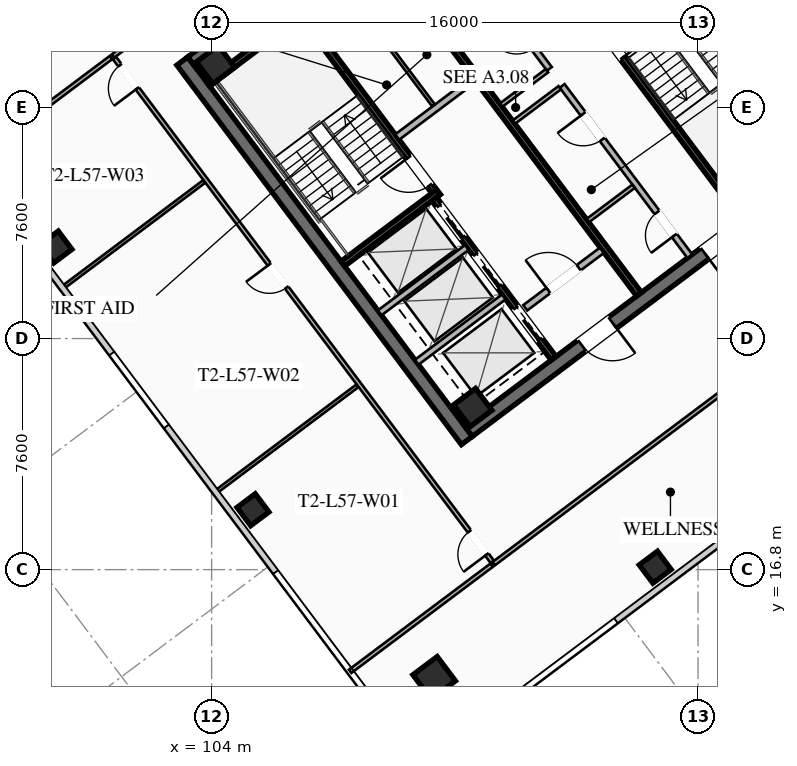
"""IFC4 building model, lengths in metres.
Left out: names, types, materials, properties, quantities, classifications, styles, units other than length and angle.
Written with IfcOpenShell. Run it as: python <this file> out.ifc"""

import sys

from ifc_helpers import new_model, si_unit, direction, frame, frame_2d, origin, origin_2d, place, context, subcontext, project, spatial, rectangle, hollow_rectangle, extrude, element, fill, save


model = new_model("IFC4")
c1 = context("Model", 3, precision=1e-05, world=origin(), true_north=direction((0.0, 1.0)))
c2 = subcontext(c1, "Body", "Model", "MODEL_VIEW")
j1 = project(units=[si_unit("LENGTHUNIT", "METRE"), si_unit("PLANEANGLEUNIT", "RADIAN")], contexts=[c1])
p1 = place(None, origin())
s1 = spatial("IfcSite", under=j1, at=p1, CompositionType="ELEMENT")
p2 = place(p1, origin())
s2 = spatial("IfcBuilding", under=s1, at=p2, CompositionType="ELEMENT")
p3 = place(p2, frame((0.0, 0.0, 211.3)))
s3 = spatial("IfcBuildingStorey", under=s2, at=p3, CompositionType="ELEMENT", Elevation=211.3)
for number, where, z_axis, x_axis in (
    (1, (112.396, 21.047, 0.0), (0.0, 0.0, 1.0), (-0.6, 0.8, 0.0)),
    (2, (115.604, 42.953, 0.0), (0.0, 0.0, 1.0), (0.6, -0.8, 0.0)),
):
    element("IfcWall", number, at=place(p3, frame(where, z_axis=z_axis, x_axis=x_axis)), inside=s3, PredefinedType="SHEAR", context=c2, shape_type="SweptSolid", body=[
        extrude(rectangle(XDim=15.6, YDim=0.45, at=frame_2d((7.8, 0.0))), origin(), (0.0, 0.0, 1.0), 3.55),
    ])
p4 = place(p3, frame((124.649, 30.518, 0.0), z_axis=(0.0, 0.0, 1.0), x_axis=(-0.8, -0.6, 0.0)))
e3 = element("IfcWall", 3, at=p4, inside=s3, PredefinedType="SHEAR", context=c2, shape_type="SweptSolid", body=[
    extrude(rectangle(XDim=15.26, YDim=0.45, at=frame_2d((7.63, 0.0))), origin(), (0.0, 0.0, 1.0), 3.55),
])
p5 = place(p4, frame((9.33, 0.0, 0.0)))
e4 = element("IfcOpeningElement", 4, at=p5, cuts=e3, PredefinedType="OPENING", context=c2, shape_type="SweptSolid", body=[
    extrude(rectangle(XDim=1.25, YDim=2.25, at=frame_2d((0.625, 1.125))), frame((0.0, 0.235, 0.0), z_axis=(0.0, -1.0, 0.0), x_axis=(1.0, 0.0, 0.0)), (0.0, 0.0, 1.0), 0.47),
])
p6 = place(p4, frame((4.28, 0.0, 0.0)))
e5 = element("IfcOpeningElement", 5, at=p6, cuts=e3, PredefinedType="OPENING", context=c2, shape_type="SweptSolid", body=[
    extrude(rectangle(XDim=1.25, YDim=2.25, at=frame_2d((0.625, 1.125))), frame((0.0, 0.235, 0.0), z_axis=(0.0, -1.0, 0.0), x_axis=(1.0, 0.0, 0.0)), (0.0, 0.0, 1.0), 0.47),
])
p7 = place(p3, frame((103.351, 33.482, 0.0), z_axis=(0.0, 0.0, 1.0), x_axis=(0.8, 0.6, 0.0)))
e6 = element("IfcWall", 6, at=p7, inside=s3, PredefinedType="SHEAR", context=c2, shape_type="SweptSolid", body=[
    extrude(rectangle(XDim=15.26, YDim=0.45, at=frame_2d((7.63, 0.0))), origin(), (0.0, 0.0, 1.0), 3.55),
])
p8 = place(p7, frame((4.68, 0.0, 0.0)))
e7 = element("IfcOpeningElement", 7, at=p8, cuts=e6, PredefinedType="OPENING", context=c2, shape_type="SweptSolid", body=[
    extrude(rectangle(XDim=1.25, YDim=2.25, at=frame_2d((0.625, 1.125))), frame((0.0, 0.235, 0.0), z_axis=(0.0, -1.0, 0.0), x_axis=(1.0, 0.0, 0.0)), (0.0, 0.0, 1.0), 0.47),
])
p9 = place(p7, frame((9.73, 0.0, 0.0)))
e8 = element("IfcOpeningElement", 8, at=p9, cuts=e6, PredefinedType="OPENING", context=c2, shape_type="SweptSolid", body=[
    extrude(rectangle(XDim=1.25, YDim=2.25, at=frame_2d((0.625, 1.125))), frame((0.0, 0.235, 0.0), z_axis=(0.0, -1.0, 0.0), x_axis=(1.0, 0.0, 0.0)), (0.0, 0.0, 1.0), 0.47),
])
for number, where, z_axis, x_axis in (
    (9, (112.59, 22.13, 0.0), (0.0, 0.0, 1.0), (0.8, 0.6, 0.0)),
    (10, (104.13, 33.41, 0.0), (0.0, 0.0, 1.0), (0.8, 0.6, 0.0)),
):
    element("IfcColumn", number, at=place(p3, frame(where, z_axis=z_axis, x_axis=x_axis)), inside=s3, PredefinedType="COLUMN", context=c2, shape_type="SweptSolid", body=[
        extrude(hollow_rectangle(XDim=0.9, YDim=0.9, WallThickness=0.04, at=origin_2d()), origin(), (0.0, 0.0, 1.0), 3.37),
    ])
p10 = place(p3, frame((111.32, 13.24, 0.0), z_axis=(0.0, 0.0, 1.0), x_axis=(0.799999996291, 0.600000004945, 0.0)))
e11 = element("IfcColumn", 11, at=p10, inside=s3, PredefinedType="COLUMN", context=c2, shape_type="SweptSolid", body=[
    extrude(hollow_rectangle(XDim=1.0, YDim=1.0, WallThickness=0.04, at=origin_2d()), origin(), (0.0, 0.0, 1.0), 3.37),
])
for number, where, z_axis, x_axis in (
    (12, (118.59, 16.88, 0.0), (0.0, 0.0, 1.0), (0.8, 0.6, 0.0)),
    (13, (98.88, 27.41, 0.0), (0.0, 0.0, 1.0), (0.8, 0.6, 0.0)),
    (14, (105.36, 18.77, 0.0), (0.0, 0.0, 1.0), (0.8, 0.6, 0.0)),
):
    element("IfcColumn", number, at=place(p3, frame(where, z_axis=z_axis, x_axis=x_axis)), inside=s3, PredefinedType="COLUMN", context=c2, shape_type="SweptSolid", body=[
        extrude(hollow_rectangle(XDim=0.75, YDim=0.75, WallThickness=0.032, at=origin_2d()), origin(), (0.0, 0.0, 1.0), 3.37),
    ])
p11 = place(p3, frame((111.44, 29.08, 0.0), z_axis=(0.0, 0.0, 1.0), x_axis=(-0.59999041401, 0.800007189403, 0.0)))
e15 = element("IfcWall", 15, at=p11, inside=s3, PredefinedType="SHEAR", context=c2, shape_type="SweptSolid", body=[
    extrude(rectangle(XDim=8.15, YDim=0.2, at=frame_2d((4.075, 0.0))), origin(), (0.0, 0.0, 1.0), 3.37),
])
p12 = place(p11, frame((0.45, 0.0, 0.0)))
e16 = element("IfcOpeningElement", 16, at=p12, cuts=e15, PredefinedType="OPENING", context=c2, shape_type="SweptSolid", body=[
    extrude(rectangle(XDim=1.15, YDim=2.2, at=frame_2d((0.575, 1.1))), frame((0.0, 0.11, 0.0), z_axis=(0.0, -1.0, 0.0), x_axis=(1.0, 0.0, 0.0)), (0.0, 0.0, 1.0), 0.22),
])
for number, where, z_axis, x_axis in (
    (17, (108.316, 26.862, 0.0), (0.0, 0.0, 1.0), (0.8, 0.6, 0.0)),
    (18, (103.876, 32.782, 0.0), (0.0, 0.0, 1.0), (0.8, 0.6, 0.0)),
):
    element("IfcWall", number, at=place(p3, frame(where, z_axis=z_axis, x_axis=x_axis)), inside=s3, PredefinedType="SHEAR", context=c2, shape_type="SweptSolid", body=[
        extrude(rectangle(XDim=3.93, YDim=0.2, at=frame_2d((1.965, 0.0))), origin(), (0.0, 0.0, 1.0), 3.37),
    ])
p13 = place(p3, frame((116.56, 34.92, 0.0), z_axis=(0.0, 0.0, 1.0), x_axis=(0.59999041401, -0.800007189403, 0.0)))
e19 = element("IfcWall", 19, at=p13, inside=s3, PredefinedType="SHEAR", context=c2, shape_type="SweptSolid", body=[
    extrude(rectangle(XDim=8.15, YDim=0.2, at=frame_2d((4.075, 0.0))), origin(), (0.0, 0.0, 1.0), 3.37),
])
p14 = place(p13, frame((0.45, 0.0, 0.0)))
e20 = element("IfcOpeningElement", 20, at=p14, cuts=e19, PredefinedType="OPENING", context=c2, shape_type="SweptSolid", body=[
    extrude(rectangle(XDim=1.15, YDim=2.2, at=frame_2d((0.575, 1.1))), frame((0.0, 0.11, 0.0), z_axis=(0.0, -1.0, 0.0), x_axis=(1.0, 0.0, 0.0)), (0.0, 0.0, 1.0), 0.22),
])
p15 = place(p3, frame((118.058, 25.856, 0.0), z_axis=(0.0, 0.0, 1.0), x_axis=(-0.600002657301, 0.799998007018, 0.0)))
e21 = element("IfcWall", 21, at=p15, inside=s3, PredefinedType="SHEAR", context=c2, shape_type="SweptSolid", body=[
    extrude(rectangle(XDim=14.7, YDim=0.2, at=frame_2d((7.35, 0.0))), origin(), (0.0, 0.0, 1.0), 3.37),
])
p16 = place(p3, frame((110.104, 31.028, 0.0), z_axis=(0.0, 0.0, 1.0), x_axis=(0.800018601094, 0.59997519774, 0.0)))
e22 = element("IfcWall", 22, at=p16, inside=s3, PredefinedType="SOLIDWALL", context=c2, shape_type="SweptSolid", body=[
    extrude(rectangle(XDim=3.15, YDim=0.22, at=frame_2d((1.575, 0.0))), origin(), (0.0, 0.0, 1.0), 2.723),
])
p17 = place(p3, frame((114.316, 25.412, 0.0), z_axis=(0.0, 0.0, 1.0), x_axis=(0.800018601094, 0.59997519774, 0.0)))
e23 = element("IfcWall", 23, at=p17, inside=s3, PredefinedType="SOLIDWALL", context=c2, shape_type="SweptSolid", body=[
    extrude(rectangle(XDim=3.15, YDim=0.22, at=frame_2d((1.575, 0.0))), origin(), (0.0, 0.0, 1.0), 2.723),
])
p18 = place(p17, frame((0.95, 0.0, 0.0)))
e24 = element("IfcOpeningElement", 24, at=p18, cuts=e23, PredefinedType="OPENING", context=c2, shape_type="SweptSolid", body=[
    extrude(rectangle(XDim=1.25, YDim=2.25, at=frame_2d((0.625, 1.125))), frame((0.0, 0.12, 0.0), z_axis=(0.0, -1.0, 0.0), x_axis=(1.0, 0.0, 0.0)), (0.0, 0.0, 1.0), 0.24),
])
p19 = place(p3, frame((115.25, 23.75, 0.0), z_axis=(0.0, 0.0, 1.0), x_axis=(-0.599994036198, 0.800004472816, 0.0)))
e25 = element("IfcWall", 25, at=p19, inside=s3, PredefinedType="SHEAR", context=c2, shape_type="SweptSolid", body=[
    extrude(rectangle(XDim=6.55, YDim=0.2, at=frame_2d((3.275, 0.0))), origin(), (0.0, 0.0, 1.0), 3.37),
])
p20 = place(p19, frame((4.975, 0.0, 0.0)))
e26 = element("IfcOpeningElement", 26, at=p20, cuts=e25, PredefinedType="OPENING", context=c2, shape_type="SweptSolid", body=[
    extrude(rectangle(XDim=1.3, YDim=2.25, at=frame_2d((0.65, 1.125))), frame((0.0, 0.11, 0.0), z_axis=(0.0, -1.0, 0.0), x_axis=(1.0, 0.0, 0.0)), (0.0, 0.0, 1.0), 0.22),
])
p21 = place(p19, frame((2.975, 0.0, 0.0)))
e27 = element("IfcOpeningElement", 27, at=p21, cuts=e25, PredefinedType="OPENING", context=c2, shape_type="SweptSolid", body=[
    extrude(rectangle(XDim=1.3, YDim=2.25, at=frame_2d((0.65, 1.125))), frame((0.0, 0.11, 0.0), z_axis=(0.0, -1.0, 0.0), x_axis=(1.0, 0.0, 0.0)), (0.0, 0.0, 1.0), 0.22),
])
p22 = place(p19, frame((0.775, 0.0, 0.0)))
e28 = element("IfcOpeningElement", 28, at=p22, cuts=e25, PredefinedType="OPENING", context=c2, shape_type="SweptSolid", body=[
    extrude(rectangle(XDim=1.3, YDim=2.25, at=frame_2d((0.65, 1.125))), frame((0.0, 0.11, 0.0), z_axis=(0.0, -1.0, 0.0), x_axis=(1.0, 0.0, 0.0)), (0.0, 0.0, 1.0), 0.22),
])
for number, where, z_axis, x_axis in (
    (29, (110.746, 23.622, 0.0), (0.0, 0.0, 1.0), (0.8, 0.6, 0.0)),
    (30, (109.528, 25.246, 0.0), (0.0, 0.0, 1.0), (0.8, 0.6, 0.0)),
):
    element("IfcWall", number, at=place(p3, frame(where, z_axis=z_axis, x_axis=x_axis)), inside=s3, PredefinedType="SOLIDWALL", context=c2, shape_type="SweptSolid", body=[
        extrude(rectangle(XDim=3.58, YDim=0.2, at=frame_2d((1.79, 0.0))), origin(), (0.0, 0.0, 1.0), 3.37),
    ])
p23 = place(p3, frame((111.296, 32.072, 0.0), z_axis=(0.0, 0.0, 1.0), x_axis=(-0.59995887973, 0.800030838552, 0.0)))
e31 = element("IfcWall", 31, at=p23, inside=s3, PredefinedType="PARTITIONING", context=c2, shape_type="SweptSolid", body=[
    extrude(rectangle(XDim=3.8, YDim=0.11, at=frame_2d((1.9, 0.0))), origin(), (0.0, 0.0, 1.0), 2.723),
])
p24 = place(p3, frame((119.73, 27.11, 0.0), z_axis=(0.0, 0.0, 1.0), x_axis=(-0.600005580459, 0.799995814625, 0.0)))
e32 = element("IfcWall", 32, at=p24, inside=s3, PredefinedType="SOLIDWALL", context=c2, shape_type="SweptSolid", body=[
    extrude(rectangle(XDim=7.0, YDim=0.2, at=frame_2d((3.5, 0.0))), origin(), (0.0, 0.0, 1.0), 2.723),
])
p25 = place(p24, frame((0.85, 0.0, 0.0)))
e33 = element("IfcOpeningElement", 33, at=p25, cuts=e32, PredefinedType="OPENING", context=c2, shape_type="SweptSolid", body=[
    extrude(rectangle(XDim=0.95, YDim=2.05, at=frame_2d((0.475, 1.025))), frame((0.0, 0.11, 0.0), z_axis=(0.0, -1.0, 0.0), x_axis=(1.0, 0.0, 0.0)), (0.0, 0.0, 1.0), 0.22),
])
p26 = place(p24, frame((4.8, 0.0, 0.0)))
e34 = element("IfcOpeningElement", 34, at=p26, cuts=e32, PredefinedType="OPENING", context=c2, shape_type="SweptSolid", body=[
    extrude(rectangle(XDim=1.05, YDim=2.2, at=frame_2d((0.525, 1.1))), frame((0.0, 0.11, 0.0), z_axis=(0.0, -1.0, 0.0), x_axis=(1.0, 0.0, 0.0)), (0.0, 0.0, 1.0), 0.22),
])
for number, where, z_axis, x_axis in (
    (35, (113.946, 31.522, 0.0), (0.0, 0.0, 1.0), (0.8, 0.6, 0.0)),
    (36, (116.376, 28.282, 0.0), (0.0, 0.0, 1.0), (0.8, 0.6, 0.0)),
):
    element("IfcWall", number, at=place(p3, frame(where, z_axis=z_axis, x_axis=x_axis)), inside=s3, PredefinedType="PARTITIONING", context=c2, shape_type="SweptSolid", body=[
        extrude(rectangle(XDim=1.88, YDim=0.135, at=frame_2d((0.94, 0.0))), origin(), (0.0, 0.0, 1.0), 2.723),
    ])
p27 = place(p3, frame((115.11, 33.27, 0.0), z_axis=(0.0, 0.0, 1.0), x_axis=(-0.600011160345, 0.79999162962, 0.0)))
e37 = element("IfcWall", 37, at=p27, inside=s3, PredefinedType="SOLIDWALL", context=c2, shape_type="SweptSolid", body=[
    extrude(rectangle(XDim=7.0, YDim=0.2, at=frame_2d((3.5, 0.0))), origin(), (0.0, 0.0, 1.0), 2.723),
])
p28 = place(p27, frame((0.85, 0.0, 0.0)))
e38 = element("IfcOpeningElement", 38, at=p28, cuts=e37, PredefinedType="OPENING", context=c2, shape_type="SweptSolid", body=[
    extrude(rectangle(XDim=0.95, YDim=2.05, at=frame_2d((0.475, 1.025))), frame((0.0, 0.11, 0.0), z_axis=(0.0, -1.0, 0.0), x_axis=(1.0, 0.0, 0.0)), (0.0, 0.0, 1.0), 0.22),
])
p29 = place(p27, frame((4.85, 0.0, 0.0)))
e39 = element("IfcOpeningElement", 39, at=p29, cuts=e37, PredefinedType="OPENING", context=c2, shape_type="SweptSolid", body=[
    extrude(rectangle(XDim=0.95, YDim=2.05, at=frame_2d((0.475, 1.025))), frame((0.0, 0.11, 0.0), z_axis=(0.0, -1.0, 0.0), x_axis=(1.0, 0.0, 0.0)), (0.0, 0.0, 1.0), 0.22),
])
p30 = place(p3, frame((113.526, 32.082, 0.0), z_axis=(0.0, 0.0, 1.0), x_axis=(0.800046745961, 0.599937666993, 0.0)))
e40 = element("IfcWall", 40, at=p30, inside=s3, PredefinedType="PARTITIONING", context=c2, shape_type="SweptSolid", body=[
    extrude(rectangle(XDim=1.88, YDim=0.135, at=frame_2d((0.94, 0.0))), origin(), (0.0, 0.0, 1.0), 2.723),
])
p31 = place(p3, frame((100.756, 33.692, 0.0), z_axis=(0.0, 0.0, 1.0), x_axis=(0.799998716732, 0.60000171102, 0.0)))
e41 = element("IfcWall", 41, at=p31, inside=s3, PredefinedType="PARTITIONING", context=c2, shape_type="SweptSolid", body=[
    extrude(rectangle(XDim=22.83, YDim=0.135, at=frame_2d((11.415, 0.0))), origin(), (0.0, 0.0, 1.0), 2.723),
])
p32 = place(p31, frame((9.38, 0.0, 0.0)))
e42 = element("IfcOpeningElement", 42, at=p32, cuts=e41, PredefinedType="OPENING", context=c2, shape_type="SweptSolid", body=[
    extrude(rectangle(XDim=0.95, YDim=2.05, at=frame_2d((0.475, 1.025))), frame((0.0, 0.077, 0.0), z_axis=(0.0, -1.0, 0.0), x_axis=(1.0, 0.0, 0.0)), (0.0, 0.0, 1.0), 0.155),
])
p33 = place(p31, frame((21.58, 0.0, 0.0)))
e43 = element("IfcOpeningElement", 43, at=p33, cuts=e41, PredefinedType="OPENING", context=c2, shape_type="SweptSolid", body=[
    extrude(rectangle(XDim=0.95, YDim=2.05, at=frame_2d((0.475, 1.025))), frame((0.0, 0.077, 0.0), z_axis=(0.0, -1.0, 0.0), x_axis=(1.0, 0.0, 0.0)), (0.0, 0.0, 1.0), 0.155),
])
p34 = place(p3, frame((124.462, 25.384, 0.0), z_axis=(0.0, 0.0, 1.0), x_axis=(-0.799997904343, -0.6000027942, 0.0)))
e44 = element("IfcWall", 44, at=p34, inside=s3, PredefinedType="PARTITIONING", context=c2, shape_type="SweptSolid", body=[
    extrude(rectangle(XDim=13.98, YDim=0.135, at=frame_2d((6.99, 0.0))), origin(), (0.0, 0.0, 1.0), 2.723),
])
p35 = place(p34, frame((3.635, 0.0, 0.0)))
e45 = element("IfcOpeningElement", 45, at=p35, cuts=e44, PredefinedType="OPENING", context=c2, shape_type="SweptSolid", body=[
    extrude(rectangle(XDim=0.95, YDim=2.05, at=frame_2d((0.475, 1.025))), frame((0.0, 0.077, 0.0), z_axis=(0.0, -1.0, 0.0), x_axis=(1.0, 0.0, 0.0)), (0.0, 0.0, 1.0), 0.155),
])
p36 = place(p3, frame((113.23, 17.06, 0.0), z_axis=(0.0, 0.0, 1.0), x_axis=(-0.600003772342, 0.79999717073, 0.0)))
e46 = element("IfcWall", 46, at=p36, inside=s3, PredefinedType="PARTITIONING", context=c2, shape_type="SweptSolid", body=[
    extrude(rectangle(XDim=20.71, YDim=0.135, at=frame_2d((10.355, 0.0))), origin(), (0.0, 0.0, 1.0), 2.723),
])
p37 = place(p36, frame((0.3, 0.0, 0.0)))
e47 = element("IfcOpeningElement", 47, at=p37, cuts=e46, PredefinedType="OPENING", context=c2, shape_type="SweptSolid", body=[
    extrude(rectangle(XDim=0.95, YDim=2.05, at=frame_2d((0.475, 1.025))), frame((0.0, 0.077, 0.0), z_axis=(0.0, -1.0, 0.0), x_axis=(1.0, 0.0, 0.0)), (0.0, 0.0, 1.0), 0.155),
])
p38 = place(p36, frame((11.272, 0.0, 0.0)))
e48 = element("IfcOpeningElement", 48, at=p38, cuts=e46, PredefinedType="OPENING", context=c2, shape_type="SweptSolid", body=[
    extrude(rectangle(XDim=0.95, YDim=2.05, at=frame_2d((0.475, 1.025))), frame((0.0, 0.077, 0.0), z_axis=(0.0, -1.0, 0.0), x_axis=(1.0, 0.0, 0.0)), (0.0, 0.0, 1.0), 0.155),
])
p39 = place(p36, frame((19.46, 0.0, 0.0)))
e49 = element("IfcOpeningElement", 49, at=p39, cuts=e46, PredefinedType="OPENING", context=c2, shape_type="SweptSolid", body=[
    extrude(rectangle(XDim=0.95, YDim=2.05, at=frame_2d((0.475, 1.025))), frame((0.0, 0.077, 0.0), z_axis=(0.0, -1.0, 0.0), x_axis=(1.0, 0.0, 0.0)), (0.0, 0.0, 1.0), 0.155),
])
for number, where, z_axis, x_axis in (
    (50, (100.692, 33.644, 0.0), (0.0, 0.0, 1.0), (-0.8, -0.6, 0.0)),
    (51, (108.558, 13.456, 0.0), (0.0, 0.0, 1.0), (0.8, 0.6, 0.0)),
):
    element("IfcWall", number, at=place(p3, frame(where, z_axis=z_axis, x_axis=x_axis)), inside=s3, PredefinedType="PARTITIONING", context=c2, shape_type="SweptSolid", body=[
        extrude(rectangle(XDim=5.82, YDim=0.135, at=frame_2d((2.91, 0.0))), origin(), (0.0, 0.0, 1.0), 2.723),
    ])
for number, where, z_axis, x_axis in (
    (52, (104.136, 19.352, 0.0), (0.0, 0.0, 1.0), (0.8, 0.6, 0.0)),
    (53, (99.096, 26.072, 0.0), (0.0, 0.0, 1.0), (0.8, 0.6, 0.0)),
):
    element("IfcWall", number, at=place(p3, frame(where, z_axis=z_axis, x_axis=x_axis)), inside=s3, PredefinedType="PARTITIONING", context=c2, shape_type="SweptSolid", body=[
        extrude(rectangle(XDim=5.82, YDim=0.11, at=frame_2d((2.91, 0.0))), origin(), (0.0, 0.0, 1.0), 2.723),
    ])
p40 = place(p5, origin())
e54 = element("IfcDoor", 54, at=p40, inside=s3, OperationType="SINGLE_SWING_LEFT", PredefinedType="DOOR", context=c2, shape_type="SweptSolid", body=[
    extrude(rectangle(XDim=1.25, YDim=2.25, at=frame_2d((0.625, 1.125))), frame((0.0, 0.025, 0.0), z_axis=(0.0, -1.0, 0.0), x_axis=(1.0, 0.0, 0.0)), (0.0, 0.0, 1.0), 0.05),
])
fill(e4, e54)
p41 = place(p6, origin())
e55 = element("IfcDoor", 55, at=p41, inside=s3, OperationType="SINGLE_SWING_RIGHT", PredefinedType="DOOR", context=c2, shape_type="SweptSolid", body=[
    extrude(rectangle(XDim=1.25, YDim=2.25, at=frame_2d((0.625, 1.125))), frame((0.0, 0.025, 0.0), z_axis=(0.0, -1.0, 0.0), x_axis=(1.0, 0.0, 0.0)), (0.0, 0.0, 1.0), 0.05),
])
fill(e5, e55)
p42 = place(p12, origin())
e56 = element("IfcDoor", 56, at=p42, inside=s3, OperationType="SINGLE_SWING_RIGHT", PredefinedType="DOOR", context=c2, shape_type="SweptSolid", body=[
    extrude(rectangle(XDim=1.15, YDim=2.2, at=frame_2d((0.575, 1.1))), frame((0.0, 0.025, 0.0), z_axis=(0.0, -1.0, 0.0), x_axis=(1.0, 0.0, 0.0)), (0.0, 0.0, 1.0), 0.05),
])
fill(e16, e56)
p43 = place(p14, origin())
e57 = element("IfcDoor", 57, at=p43, inside=s3, OperationType="SINGLE_SWING_RIGHT", PredefinedType="DOOR", context=c2, shape_type="SweptSolid", body=[
    extrude(rectangle(XDim=1.15, YDim=2.2, at=frame_2d((0.575, 1.1))), frame((0.0, 0.025, 0.0), z_axis=(0.0, -1.0, 0.0), x_axis=(1.0, 0.0, 0.0)), (0.0, 0.0, 1.0), 0.05),
])
fill(e20, e57)
p44 = place(p18, origin())
e58 = element("IfcDoor", 58, at=p44, inside=s3, OperationType="SINGLE_SWING_LEFT", PredefinedType="DOOR", context=c2, shape_type="SweptSolid", body=[
    extrude(rectangle(XDim=1.25, YDim=2.25, at=frame_2d((0.625, 1.125))), frame((0.0, 0.025, 0.0), z_axis=(0.0, -1.0, 0.0), x_axis=(1.0, 0.0, 0.0)), (0.0, 0.0, 1.0), 0.05),
])
fill(e24, e58)
p45 = place(p25, origin())
e59 = element("IfcDoor", 59, at=p45, inside=s3, OperationType="SINGLE_SWING_LEFT", PredefinedType="DOOR", context=c2, shape_type="SweptSolid", body=[
    extrude(rectangle(XDim=0.95, YDim=2.05, at=frame_2d((0.475, 1.025))), frame((0.0, 0.025, 0.0), z_axis=(0.0, -1.0, 0.0), x_axis=(1.0, 0.0, 0.0)), (0.0, 0.0, 1.0), 0.05),
])
fill(e33, e59)
p46 = place(p26, origin())
e60 = element("IfcDoor", 60, at=p46, inside=s3, OperationType="SINGLE_SWING_RIGHT", PredefinedType="DOOR", context=c2, shape_type="SweptSolid", body=[
    extrude(rectangle(XDim=1.05, YDim=2.2, at=frame_2d((0.525, 1.1))), frame((0.0, 0.025, 0.0), z_axis=(0.0, -1.0, 0.0), x_axis=(1.0, 0.0, 0.0)), (0.0, 0.0, 1.0), 0.05),
])
fill(e34, e60)
p47 = place(p37, origin())
e61 = element("IfcDoor", 61, at=p47, inside=s3, OperationType="SINGLE_SWING_LEFT", PredefinedType="DOOR", context=c2, shape_type="SweptSolid", body=[
    extrude(rectangle(XDim=0.95, YDim=2.05, at=frame_2d((0.475, 1.025))), frame((0.0, 0.025, 0.0), z_axis=(0.0, -1.0, 0.0), x_axis=(1.0, 0.0, 0.0)), (0.0, 0.0, 1.0), 0.05),
])
fill(e47, e61)
p48 = place(p38, origin())
e62 = element("IfcDoor", 62, at=p48, inside=s3, OperationType="SINGLE_SWING_RIGHT", PredefinedType="DOOR", context=c2, shape_type="SweptSolid", body=[
    extrude(rectangle(XDim=0.95, YDim=2.05, at=frame_2d((0.475, 1.025))), frame((0.0, 0.025, 0.0), z_axis=(0.0, -1.0, 0.0), x_axis=(1.0, 0.0, 0.0)), (0.0, 0.0, 1.0), 0.05),
])
fill(e48, e62)
p49 = place(p39, origin())
e63 = element("IfcDoor", 63, at=p49, inside=s3, OperationType="SINGLE_SWING_LEFT", PredefinedType="DOOR", context=c2, shape_type="SweptSolid", body=[
    extrude(rectangle(XDim=0.95, YDim=2.05, at=frame_2d((0.475, 1.025))), frame((0.0, 0.025, 0.0), z_axis=(0.0, -1.0, 0.0), x_axis=(1.0, 0.0, 0.0)), (0.0, 0.0, 1.0), 0.05),
])
fill(e49, e63)
p50 = place(p20, origin())
e64 = element("IfcDoor", 64, at=p50, inside=s3, OperationType="SLIDING_TO_LEFT", PredefinedType="DOOR", context=c2, shape_type="SweptSolid", body=[
    extrude(rectangle(XDim=1.3, YDim=2.25, at=frame_2d((0.65, 1.125))), frame((0.0, 0.025, 0.0), z_axis=(0.0, -1.0, 0.0), x_axis=(1.0, 0.0, 0.0)), (0.0, 0.0, 1.0), 0.05),
])
fill(e26, e64)
p51 = place(p21, origin())
e65 = element("IfcDoor", 65, at=p51, inside=s3, OperationType="SLIDING_TO_LEFT", PredefinedType="DOOR", context=c2, shape_type="SweptSolid", body=[
    extrude(rectangle(XDim=1.3, YDim=2.25, at=frame_2d((0.65, 1.125))), frame((0.0, 0.025, 0.0), z_axis=(0.0, -1.0, 0.0), x_axis=(1.0, 0.0, 0.0)), (0.0, 0.0, 1.0), 0.05),
])
fill(e27, e65)
p52 = place(p22, origin())
e66 = element("IfcDoor", 66, at=p52, inside=s3, OperationType="SLIDING_TO_LEFT", PredefinedType="DOOR", context=c2, shape_type="SweptSolid", body=[
    extrude(rectangle(XDim=1.3, YDim=2.25, at=frame_2d((0.65, 1.125))), frame((0.0, 0.025, 0.0), z_axis=(0.0, -1.0, 0.0), x_axis=(1.0, 0.0, 0.0)), (0.0, 0.0, 1.0), 0.05),
])
fill(e28, e66)
save(model, sys.argv[1])
